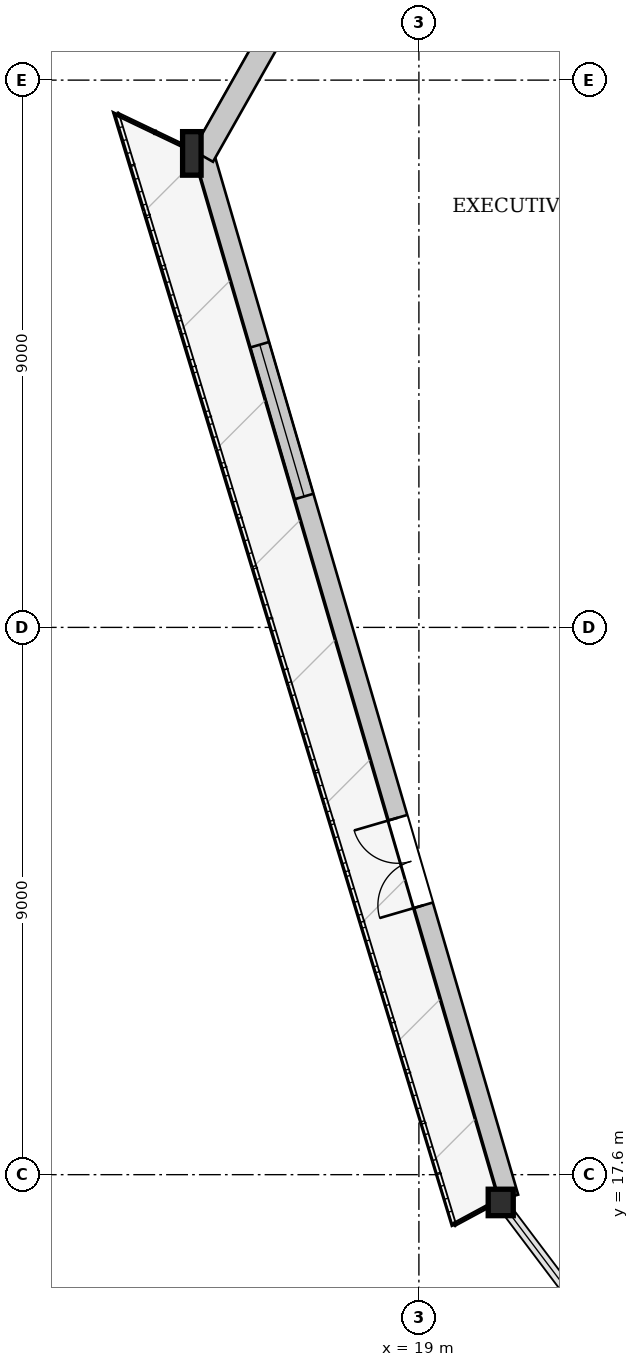
"""IFC4 building model, lengths in metres.
Left out: names, types, materials, properties, quantities, classifications, styles, units other than length and angle.
Written with IfcOpenShell. Run it as: python <this file> out.ifc"""

import sys

from ifc_helpers import new_model, si_unit, direction, frame, frame_2d, origin, origin_2d, place, context, subcontext, project, spatial, rectangle, i_section, extrude, source, transform, mapped, element, fill, save


model = new_model("IFC4")
c1 = context("Model", 3, precision=1e-05, world=origin(), true_north=direction((0.0, 1.0)))
c2 = subcontext(c1, "Body", "Model", "MODEL_VIEW")
j1 = project(units=[si_unit("LENGTHUNIT", "METRE"), si_unit("PLANEANGLEUNIT", "RADIAN")], contexts=[c1])
p1 = place(None, origin())
s1 = spatial("IfcSite", under=j1, at=p1, CompositionType="ELEMENT")
p2 = place(p1, origin())
s2 = spatial("IfcBuilding", under=s1, at=p2, CompositionType="ELEMENT")
p3 = place(p2, frame((0.0, 0.0, 150.15)))
s3 = spatial("IfcBuildingStorey", under=s2, at=p3, CompositionType="ELEMENT", Elevation=150.15)
m1 = source(origin(), c2, "Body", "SweptSolid", [
    extrude(i_section(OverallWidth=0.304, OverallDepth=0.716, WebThickness=0.021, FlangeThickness=0.04, at=origin_2d()), origin(), (0.0, 0.0, 1.0), 3.387),
])
p4 = place(p3, frame((15.283, 34.444, 0.0), z_axis=(-0.010092527178, -0.029268328816, 0.999520638018), x_axis=(0.945372981626, -0.325990683319, 0.0)))
e1 = element("IfcColumn", 1, at=p4, inside=s3, PredefinedType="COLUMN", context=c2, shape_type="MappedRepresentation", body=[
    mapped(m1, transform((0.0, 0.0, 0.0), x_axis=(1.0, 0.0, 0.0), y_axis=(0.0, 1.0, 0.0), z_axis=(0.0, 0.0, 1.0), scale=1.0)),
])
m2 = source(origin(), c2, "Body", "SweptSolid", [
    extrude(i_section(OverallWidth=0.412, OverallDepth=0.435, WebThickness=0.031, FlangeThickness=0.05, at=origin_2d()), origin(), (0.0, 0.0, 1.0), 3.386),
])
p5 = place(p3, frame((20.325, 17.182, 0.0), z_axis=(0.012184895885, -0.022783592306, 0.999666162393), x_axis=(0.881811630605, 0.471601789786, 0.0)))
e2 = element("IfcColumn", 2, at=p5, inside=s3, PredefinedType="COLUMN", context=c2, shape_type="MappedRepresentation", body=[
    mapped(m2, transform((0.0, 0.0, 0.0), x_axis=(1.0, 0.0, 0.0), y_axis=(0.0, 1.0, 0.0), z_axis=(0.0, 0.0, 1.0), scale=1.0)),
])
p6 = place(p3, frame((20.479, 17.227, 0.0), z_axis=(0.0, 0.0, 1.0), x_axis=(-0.280389388872, 0.959886342547, 0.0)))
e3 = element("IfcWall", 3, at=p6, inside=s3, PredefinedType="SOLIDWALL", context=c2, shape_type="SweptSolid", body=[
    extrude(rectangle(XDim=17.984, YDim=0.32, at=frame_2d((8.992, 0.0))), origin(), (0.0, 0.0, 1.0), 2.692),
])
p7 = place(p6, frame((5.005, 0.0, 0.0)))
e4 = element("IfcOpeningElement", 4, at=p7, cuts=e3, PredefinedType="OPENING", context=c2, shape_type="SweptSolid", body=[
    extrude(rectangle(XDim=1.5, YDim=2.3, at=frame_2d((0.75, 1.15))), frame((0.0, 0.17, 0.0), z_axis=(0.0, -1.0, 0.0), x_axis=(1.0, 0.0, 0.0)), (0.0, 0.0, 1.0), 0.34),
])
p8 = place(p6, frame((12.008, 0.0, 0.25)))
e5 = element("IfcOpeningElement", 5, at=p8, cuts=e3, PredefinedType="OPENING", context=c2, shape_type="SweptSolid", body=[
    extrude(rectangle(XDim=2.6, YDim=2.35, at=frame_2d((1.3, 1.175))), frame((0.0, 0.17, 0.0), z_axis=(0.0, -1.0, 0.0), x_axis=(1.0, 0.0, 0.0)), (0.0, 0.0, 1.0), 0.34),
])
p9 = place(p3, frame((15.448, 34.351, 0.0), z_axis=(0.0, 0.0, 1.0), x_axis=(0.492381780001, 0.870379332661, 0.0)))
e6 = element("IfcWall", 6, at=p9, inside=s3, PredefinedType="SOLIDWALL", context=c2, shape_type="SweptSolid", body=[
    extrude(rectangle(XDim=4.933, YDim=0.38, at=frame_2d((2.466, 0.0))), origin(), (0.0, 0.0, 1.0), 2.692),
])
m3 = source(origin(), c2, "Body", "SweptSolid", [
    extrude(rectangle(XDim=1.5, YDim=2.3, at=frame_2d((0.75, 1.15))), frame((0.0, 0.025, 0.0), z_axis=(0.0, -1.0, 0.0), x_axis=(1.0, 0.0, 0.0)), (0.0, 0.0, 1.0), 0.05),
])
p10 = place(p7, origin())
e7 = element("IfcDoor", 7, at=p10, inside=s3, OperationType="DOUBLE_DOOR_SINGLE_SWING", PredefinedType="DOOR", context=c2, shape_type="MappedRepresentation", body=[
    mapped(m3, transform((0.0, 0.0, 0.0), x_axis=(1.0, 0.0, 0.0), y_axis=(0.0, 1.0, 0.0), z_axis=(0.0, 0.0, 1.0), scale=1.0)),
])
fill(e4, e7)
m4 = source(origin(), c2, "Body", "SweptSolid", [
    extrude(rectangle(XDim=2.6, YDim=2.35, at=frame_2d((1.3, 1.175))), frame((0.0, 0.03, 0.0), z_axis=(0.0, -1.0, 0.0), x_axis=(1.0, 0.0, 0.0)), (0.0, 0.0, 1.0), 0.06),
])
p11 = place(p8, origin())
e8 = element("IfcWindow", 8, at=p11, inside=s3, PartitioningType="SINGLE_PANEL", PredefinedType="WINDOW", context=c2, shape_type="MappedRepresentation", body=[
    mapped(m4, transform((0.0, 0.0, 0.0), x_axis=(1.0, 0.0, 0.0), y_axis=(0.0, 1.0, 0.0), z_axis=(0.0, 0.0, 1.0), scale=1.0)),
])
fill(e5, e8)
save(model, sys.argv[1])
